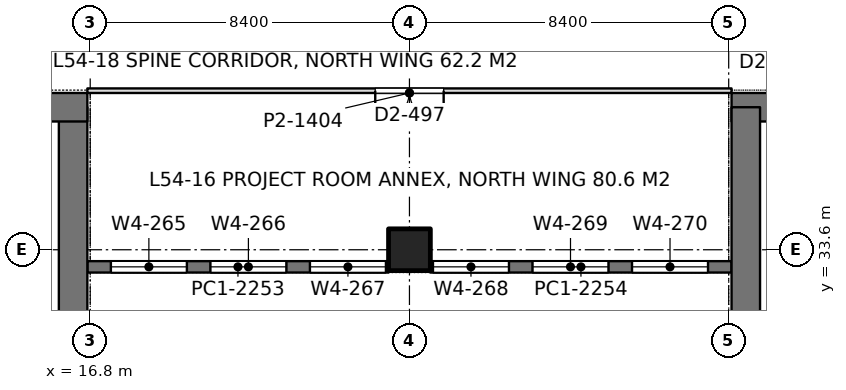
"""IFC4 building model, lengths in metres.
Left out: names, types, materials, properties, quantities, classifications, styles, units other than length and angle.
Written with IfcOpenShell. Run it as: python <this file> out.ifc"""

import sys

from ifc_helpers import new_model, si_unit, direction, frame, frame_2d, origin, origin_2d, place, context, subcontext, project, spatial, rectangle, extrude, element, fill, save


model = new_model("IFC4")
c1 = context("Model", 3, precision=1e-05, world=origin(), true_north=direction((0.0, 1.0)))
c2 = subcontext(c1, "Body", "Model", "MODEL_VIEW")
j1 = project(units=[si_unit("LENGTHUNIT", "METRE"), si_unit("PLANEANGLEUNIT", "RADIAN")], contexts=[c1])
p1 = place(None, origin())
s1 = spatial("IfcSite", under=j1, at=p1, CompositionType="ELEMENT")
p2 = place(p1, origin())
s2 = spatial("IfcBuilding", under=s1, at=p2, CompositionType="ELEMENT")
p3 = place(p2, frame((0.0, 0.0, 236.4)))
s3 = spatial("IfcBuildingStorey", under=s2, at=p3, CompositionType="ELEMENT", Elevation=236.4)
p4 = place(p3, frame((25.2, 33.6, 0.0), z_axis=(0.0, 0.0, 1.0), x_axis=(1.0, 0.0, 0.0)))
e1 = element("IfcColumn", 1, at=p4, inside=s3, PredefinedType="COLUMN", context=c2, shape_type="SweptSolid", body=[
    extrude(rectangle(XDim=1.1, YDim=1.1, at=origin_2d()), origin(), (0.0, 0.0, 1.0), 4.2),
])
p5 = place(p3, frame((-1.125, 37.35, 0.0), z_axis=(0.0, 0.0, 1.0), x_axis=(1.0, 0.0, 0.0)))
e2 = element("IfcWall", 2, at=p5, inside=s3, PredefinedType="SHEAR", context=c2, shape_type="SweptSolid", body=[
    extrude(rectangle(XDim=17.85, YDim=0.75, at=frame_2d((8.925, 0.0))), origin(), (0.0, 0.0, 1.0), 4.2),
])
p6 = place(p5, frame((8.875, 0.0, 0.0)))
e3 = element("IfcOpeningElement", 3, at=p6, cuts=e2, PredefinedType="OPENING", context=c2, shape_type="SweptSolid", body=[
    extrude(rectangle(XDim=1.8, YDim=2.4, at=frame_2d((0.9, 1.2))), frame((0.0, 0.385, 0.0), z_axis=(0.0, -1.0, 0.0), x_axis=(1.0, 0.0, 0.0)), (0.0, 0.0, 1.0), 0.77),
])
p7 = place(p3, frame((16.35, 27.8, 0.0), z_axis=(0.0, 0.0, 1.0), x_axis=(0.0, 1.0, 0.0)))
e4 = element("IfcWall", 4, at=p7, inside=s3, PredefinedType="SHEAR", context=c2, shape_type="SweptSolid", body=[
    extrude(rectangle(XDim=9.55, YDim=0.75, at=frame_2d((4.775, 0.0))), origin(), (0.0, 0.0, 1.0), 4.2),
])
p8 = place(p3, frame((33.675, 37.35, 0.0), z_axis=(0.0, 0.0, 1.0), x_axis=(1.0, 0.0, 0.0)))
e5 = element("IfcWall", 5, at=p8, inside=s3, PredefinedType="SHEAR", context=c2, shape_type="SweptSolid", body=[
    extrude(rectangle(XDim=17.85, YDim=0.75, at=frame_2d((8.925, 0.0))), origin(), (0.0, 0.0, 1.0), 4.2),
])
p9 = place(p8, frame((7.175, 0.0, 0.0)))
e6 = element("IfcOpeningElement", 6, at=p9, cuts=e5, PredefinedType="OPENING", context=c2, shape_type="SweptSolid", body=[
    extrude(rectangle(XDim=1.8, YDim=2.4, at=frame_2d((0.9, 1.2))), frame((0.0, 0.385, 0.0), z_axis=(0.0, -1.0, 0.0), x_axis=(1.0, 0.0, 0.0)), (0.0, 0.0, 1.0), 0.77),
])
p10 = place(p3, frame((34.05, 27.8, 0.0), z_axis=(0.0, 0.0, 1.0), x_axis=(0.0, 1.0, 0.0)))
e7 = element("IfcWall", 7, at=p10, inside=s3, PredefinedType="SHEAR", context=c2, shape_type="SweptSolid", body=[
    extrude(rectangle(XDim=9.55, YDim=0.75, at=frame_2d((4.775, 0.0))), origin(), (0.0, 0.0, 1.0), 4.2),
])
p11 = place(p3, frame((16.725, 33.15, 0.0), z_axis=(0.0, 0.0, 1.0), x_axis=(1.0, 0.0, 0.0)))
e8 = element("IfcWall", 8, at=p11, inside=s3, PredefinedType="SOLIDWALL", context=c2, shape_type="SweptSolid", body=[
    extrude(rectangle(XDim=7.925, YDim=0.3, at=frame_2d((3.962, 0.0))), origin(), (0.0, 0.0, 1.0), 4.05),
])
p12 = place(p11, frame((0.619, 0.0, 0.9)))
e9 = element("IfcOpeningElement", 9, at=p12, cuts=e8, PredefinedType="OPENING", context=c2, shape_type="SweptSolid", body=[
    extrude(rectangle(XDim=2.0, YDim=1.9, at=frame_2d((1.0, 0.95))), frame((0.0, 0.16, 0.0), z_axis=(0.0, -1.0, 0.0), x_axis=(1.0, 0.0, 0.0)), (0.0, 0.0, 1.0), 0.32),
])
p13 = place(p11, frame((3.238, 0.0, 0.9)))
e10 = element("IfcOpeningElement", 10, at=p13, cuts=e8, PredefinedType="OPENING", context=c2, shape_type="SweptSolid", body=[
    extrude(rectangle(XDim=2.0, YDim=1.9, at=frame_2d((1.0, 0.95))), frame((0.0, 0.16, 0.0), z_axis=(0.0, -1.0, 0.0), x_axis=(1.0, 0.0, 0.0)), (0.0, 0.0, 1.0), 0.32),
])
p14 = place(p11, frame((5.856, 0.0, 0.9)))
e11 = element("IfcOpeningElement", 11, at=p14, cuts=e8, PredefinedType="OPENING", context=c2, shape_type="SweptSolid", body=[
    extrude(rectangle(XDim=2.0, YDim=1.9, at=frame_2d((1.0, 0.95))), frame((0.0, 0.16, 0.0), z_axis=(0.0, -1.0, 0.0), x_axis=(1.0, 0.0, 0.0)), (0.0, 0.0, 1.0), 0.32),
])
p15 = place(p3, frame((25.75, 33.15, 0.0), z_axis=(0.0, 0.0, 1.0), x_axis=(1.0, 0.0, 0.0)))
e12 = element("IfcWall", 12, at=p15, inside=s3, PredefinedType="SOLIDWALL", context=c2, shape_type="SweptSolid", body=[
    extrude(rectangle(XDim=7.925, YDim=0.3, at=frame_2d((3.962, 0.0))), origin(), (0.0, 0.0, 1.0), 4.05),
])
p16 = place(p15, frame((0.069, 0.0, 0.9)))
e13 = element("IfcOpeningElement", 13, at=p16, cuts=e12, PredefinedType="OPENING", context=c2, shape_type="SweptSolid", body=[
    extrude(rectangle(XDim=2.0, YDim=1.9, at=frame_2d((1.0, 0.95))), frame((0.0, 0.16, 0.0), z_axis=(0.0, -1.0, 0.0), x_axis=(1.0, 0.0, 0.0)), (0.0, 0.0, 1.0), 0.32),
])
p17 = place(p15, frame((2.688, 0.0, 0.9)))
e14 = element("IfcOpeningElement", 14, at=p17, cuts=e12, PredefinedType="OPENING", context=c2, shape_type="SweptSolid", body=[
    extrude(rectangle(XDim=2.0, YDim=1.9, at=frame_2d((1.0, 0.95))), frame((0.0, 0.16, 0.0), z_axis=(0.0, -1.0, 0.0), x_axis=(1.0, 0.0, 0.0)), (0.0, 0.0, 1.0), 0.32),
])
p18 = place(p15, frame((5.306, 0.0, 0.9)))
e15 = element("IfcOpeningElement", 15, at=p18, cuts=e12, PredefinedType="OPENING", context=c2, shape_type="SweptSolid", body=[
    extrude(rectangle(XDim=2.0, YDim=1.9, at=frame_2d((1.0, 0.95))), frame((0.0, 0.16, 0.0), z_axis=(0.0, -1.0, 0.0), x_axis=(1.0, 0.0, 0.0)), (0.0, 0.0, 1.0), 0.32),
])
p19 = place(p3, frame((16.725, 37.785, 0.0), z_axis=(0.0, 0.0, 1.0), x_axis=(1.0, 0.0, 0.0)))
e16 = element("IfcWall", 16, at=p19, inside=s3, PredefinedType="PARTITIONING", context=c2, shape_type="SweptSolid", body=[
    extrude(rectangle(XDim=16.95, YDim=0.12, at=frame_2d((8.475, 0.0))), origin(), (0.0, 0.0, 1.0), 3.55),
])
p20 = place(p19, frame((7.575, 0.0, 0.0)))
e17 = element("IfcOpeningElement", 17, at=p20, cuts=e16, PredefinedType="OPENING", context=c2, shape_type="SweptSolid", body=[
    extrude(rectangle(XDim=1.8, YDim=2.2, at=frame_2d((0.9, 1.1))), frame((0.0, 0.07, 0.0), z_axis=(0.0, -1.0, 0.0), x_axis=(1.0, 0.0, 0.0)), (0.0, 0.0, 1.0), 0.14),
])
p21 = place(p12, origin())
e18 = element("IfcWindow", 18, at=p21, inside=s3, PartitioningType="SINGLE_PANEL", PredefinedType="WINDOW", context=c2, shape_type="SweptSolid", body=[
    extrude(rectangle(XDim=2.0, YDim=1.9, at=frame_2d((1.0, 0.95))), frame((0.0, 0.03, 0.0), z_axis=(0.0, -1.0, 0.0), x_axis=(1.0, 0.0, 0.0)), (0.0, 0.0, 1.0), 0.06),
])
fill(e9, e18)
p22 = place(p13, origin())
e19 = element("IfcWindow", 19, at=p22, inside=s3, PartitioningType="SINGLE_PANEL", PredefinedType="WINDOW", context=c2, shape_type="SweptSolid", body=[
    extrude(rectangle(XDim=2.0, YDim=1.9, at=frame_2d((1.0, 0.95))), frame((0.0, 0.03, 0.0), z_axis=(0.0, -1.0, 0.0), x_axis=(1.0, 0.0, 0.0)), (0.0, 0.0, 1.0), 0.06),
])
fill(e10, e19)
p23 = place(p14, origin())
e20 = element("IfcWindow", 20, at=p23, inside=s3, PartitioningType="SINGLE_PANEL", PredefinedType="WINDOW", context=c2, shape_type="SweptSolid", body=[
    extrude(rectangle(XDim=2.0, YDim=1.9, at=frame_2d((1.0, 0.95))), frame((0.0, 0.03, 0.0), z_axis=(0.0, -1.0, 0.0), x_axis=(1.0, 0.0, 0.0)), (0.0, 0.0, 1.0), 0.06),
])
fill(e11, e20)
p24 = place(p16, origin())
e21 = element("IfcWindow", 21, at=p24, inside=s3, PartitioningType="SINGLE_PANEL", PredefinedType="WINDOW", context=c2, shape_type="SweptSolid", body=[
    extrude(rectangle(XDim=2.0, YDim=1.9, at=frame_2d((1.0, 0.95))), frame((0.0, 0.03, 0.0), z_axis=(0.0, -1.0, 0.0), x_axis=(1.0, 0.0, 0.0)), (0.0, 0.0, 1.0), 0.06),
])
fill(e13, e21)
p25 = place(p17, origin())
e22 = element("IfcWindow", 22, at=p25, inside=s3, PartitioningType="SINGLE_PANEL", PredefinedType="WINDOW", context=c2, shape_type="SweptSolid", body=[
    extrude(rectangle(XDim=2.0, YDim=1.9, at=frame_2d((1.0, 0.95))), frame((0.0, 0.03, 0.0), z_axis=(0.0, -1.0, 0.0), x_axis=(1.0, 0.0, 0.0)), (0.0, 0.0, 1.0), 0.06),
])
fill(e14, e22)
p26 = place(p18, origin())
e23 = element("IfcWindow", 23, at=p26, inside=s3, PartitioningType="SINGLE_PANEL", PredefinedType="WINDOW", context=c2, shape_type="SweptSolid", body=[
    extrude(rectangle(XDim=2.0, YDim=1.9, at=frame_2d((1.0, 0.95))), frame((0.0, 0.03, 0.0), z_axis=(0.0, -1.0, 0.0), x_axis=(1.0, 0.0, 0.0)), (0.0, 0.0, 1.0), 0.06),
])
fill(e15, e23)
p27 = place(p20, frame((1.8, 0.0, 0.0), z_axis=(0.0, 0.0, 1.0), x_axis=(-1.0, 0.0, 0.0)))
e24 = element("IfcDoor", 24, at=p27, inside=s3, OperationType="DOUBLE_DOOR_SINGLE_SWING", PredefinedType="DOOR", context=c2, shape_type="SweptSolid", body=[
    extrude(rectangle(XDim=1.8, YDim=2.2, at=frame_2d((0.9, 1.1))), frame((0.0, 0.025, 0.0), z_axis=(0.0, -1.0, 0.0), x_axis=(1.0, 0.0, 0.0)), (0.0, 0.0, 1.0), 0.05),
])
fill(e17, e24)
save(model, sys.argv[1])
